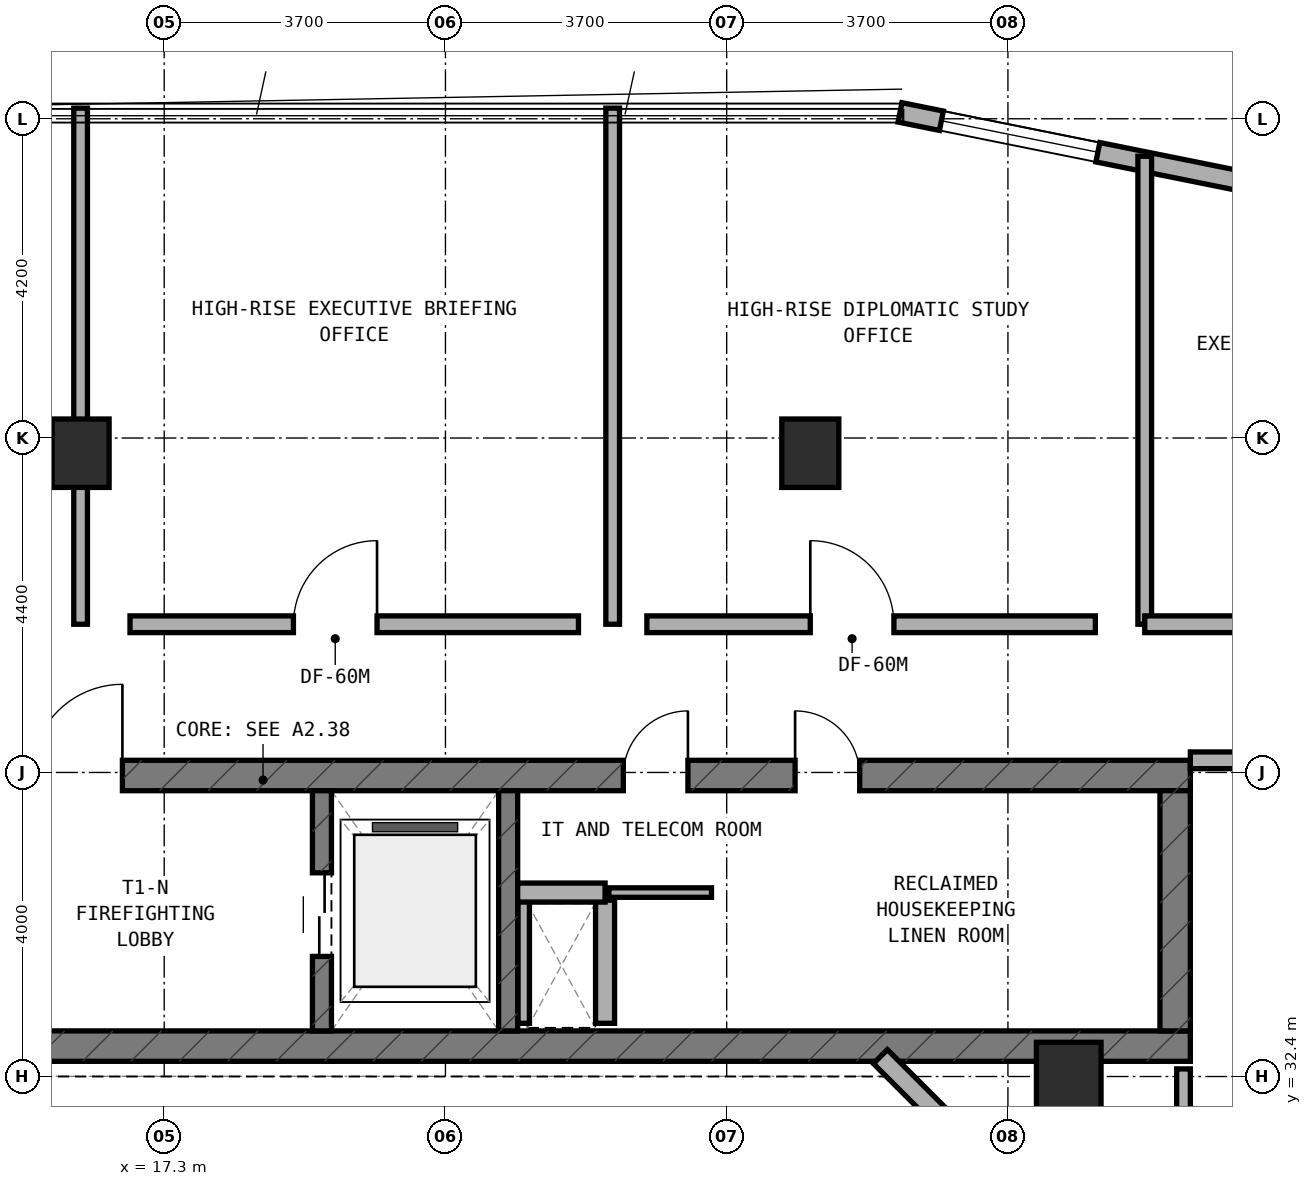
"""IFC4 building model, lengths in metres.
Left out: names, types, materials, properties, quantities, classifications, styles, units other than length and angle.
Written with IfcOpenShell. Run it as: python <this file> out.ifc"""

import sys

from ifc_helpers import new_model, si_unit, direction, frame, frame_2d, origin, origin_2d, place, context, subcontext, project, spatial, rectangle, extrude, element, fill, save


model = new_model("IFC4")
c1 = context("Model", 3, precision=1e-05, world=origin(), true_north=direction((0.0, 1.0)))
c2 = subcontext(c1, "Body", "Model", "MODEL_VIEW")
j1 = project(units=[si_unit("LENGTHUNIT", "METRE"), si_unit("PLANEANGLEUNIT", "RADIAN")], contexts=[c1])
p1 = place(None, origin())
s1 = spatial("IfcSite", under=j1, at=p1, CompositionType="ELEMENT")
p2 = place(p1, origin())
s2 = spatial("IfcBuilding", under=s1, at=p2, CompositionType="ELEMENT")
p3 = place(p2, frame((0.0, 0.0, 169.5)))
s3 = spatial("IfcBuildingStorey", under=s2, at=p3, CompositionType="ELEMENT", Elevation=169.5)
p4 = place(p3, frame((6.4, 32.8, 0.0), z_axis=(0.0, 0.0, 1.0), x_axis=(1.0, 0.0, 0.0)))
e1 = element("IfcWall", 1, at=p4, inside=s3, PredefinedType="SHEAR", context=c2, shape_type="SweptSolid", body=[
    extrude(rectangle(XDim=24.4, YDim=0.4, at=frame_2d((12.2, 0.0))), origin(), (0.0, 0.0, 1.0), 3.5),
])
p5 = place(p4, frame((6.05, 0.0, 0.0)))
e2 = element("IfcOpeningElement", 2, at=p5, cuts=e1, PredefinedType="OPENING", context=c2, shape_type="SweptSolid", body=[
    extrude(rectangle(XDim=1.1, YDim=2.15, at=frame_2d((0.55, 1.075))), frame((0.0, 0.21, 0.0), z_axis=(0.0, -1.0, 0.0), x_axis=(1.0, 0.0, 0.0)), (0.0, 0.0, 1.0), 0.42),
])
p6 = place(p3, frame((6.4, 36.36, 0.0), z_axis=(0.0, 0.0, 1.0), x_axis=(1.0, 0.0, 0.0)))
e3 = element("IfcWall", 3, at=p6, inside=s3, PredefinedType="SHEAR", context=c2, shape_type="SweptSolid", body=[
    extrude(rectangle(XDim=24.4, YDim=0.4, at=frame_2d((12.2, 0.0))), origin(), (0.0, 0.0, 1.0), 3.5),
])
p7 = place(p6, frame((9.15, 0.0, 0.0)))
e4 = element("IfcOpeningElement", 4, at=p7, cuts=e3, PredefinedType="OPENING", context=c2, shape_type="SweptSolid", body=[
    extrude(rectangle(XDim=1.2, YDim=2.15, at=frame_2d((0.6, 1.075))), frame((0.0, 0.21, 0.0), z_axis=(0.0, -1.0, 0.0), x_axis=(1.0, 0.0, 0.0)), (0.0, 0.0, 1.0), 0.42),
])
p8 = place(p6, frame((19.2, 0.0, 0.0)))
e5 = element("IfcOpeningElement", 5, at=p8, cuts=e3, PredefinedType="OPENING", context=c2, shape_type="SweptSolid", body=[
    extrude(rectangle(XDim=0.85, YDim=2.1, at=frame_2d((0.425, 1.05))), frame((0.0, 0.21, 0.0), z_axis=(0.0, -1.0, 0.0), x_axis=(1.0, 0.0, 0.0)), (0.0, 0.0, 1.0), 0.42),
])
p9 = place(p6, frame((16.94, 0.0, 0.0)))
e6 = element("IfcOpeningElement", 6, at=p9, cuts=e3, PredefinedType="OPENING", context=c2, shape_type="SweptSolid", body=[
    extrude(rectangle(XDim=0.85, YDim=2.1, at=frame_2d((0.425, 1.05))), frame((0.0, 0.21, 0.0), z_axis=(0.0, -1.0, 0.0), x_axis=(1.0, 0.0, 0.0)), (0.0, 0.0, 1.0), 0.42),
])
p10 = place(p3, frame((30.6, 33.0, 0.0), z_axis=(0.0, 0.0, 1.0), x_axis=(0.0, 1.0, 0.0)))
e7 = element("IfcWall", 7, at=p10, inside=s3, PredefinedType="SHEAR", context=c2, shape_type="SweptSolid", body=[
    extrude(rectangle(XDim=3.16, YDim=0.4, at=frame_2d((1.58, 0.0))), origin(), (0.0, 0.0, 1.0), 3.5),
])
p11 = place(p3, frame((19.375, 33.0, 0.0), z_axis=(0.0, 0.0, 1.0), x_axis=(0.0, 1.0, 0.0)))
e8 = element("IfcWall", 8, at=p11, inside=s3, PredefinedType="STANDARD", context=c2, shape_type="SweptSolid", body=[
    extrude(rectangle(XDim=3.16, YDim=0.25, at=frame_2d((1.58, 0.0))), origin(), (0.0, 0.0, 1.0), 3.18),
])
p12 = place(p11, frame((0.98, 0.0, 0.0)))
e9 = element("IfcOpeningElement", 9, at=p12, cuts=e8, PredefinedType="OPENING", context=c2, shape_type="SweptSolid", body=[
    extrude(rectangle(XDim=1.1, YDim=2.15, at=frame_2d((0.55, 1.075))), frame((0.0, 0.135, 0.0), z_axis=(0.0, -1.0, 0.0), x_axis=(1.0, 0.0, 0.0)), (0.0, 0.0, 1.0), 0.27),
])
p13 = place(p3, frame((21.825, 33.0, 0.0), z_axis=(0.0, 0.0, 1.0), x_axis=(0.0, 1.0, 0.0)))
e10 = element("IfcWall", 10, at=p13, inside=s3, PredefinedType="STANDARD", context=c2, shape_type="SweptSolid", body=[
    extrude(rectangle(XDim=3.16, YDim=0.25, at=frame_2d((1.58, 0.0))), origin(), (0.0, 0.0, 1.0), 3.18),
])
for number, where, z_axis, x_axis in (
    (11, (16.2, 40.6, 0.0), (0.0, 0.0, 1.0), (1.0, 0.0, 0.0)),
    (12, (25.8, 40.6, 0.0), (0.0, 0.0, 1.0), (1.0, 0.0, 0.0)),
):
    element("IfcColumn", number, at=place(p3, frame(where, z_axis=z_axis, x_axis=x_axis)), inside=s3, PredefinedType="COLUMN", context=c2, shape_type="SweptSolid", body=[
        extrude(rectangle(XDim=0.75, YDim=0.9, at=origin_2d()), origin(), (0.0, 0.0, 1.0), 3.5),
    ])
p14 = place(p3, frame((29.2, 32.35, 0.0), z_axis=(0.0, 0.0, 1.0), x_axis=(1.0, 0.0, 0.0)))
e13 = element("IfcColumn", 13, at=p14, inside=s3, PredefinedType="COLUMN", context=c2, shape_type="SweptSolid", body=[
    extrude(rectangle(XDim=0.85, YDim=1.0, at=origin_2d()), origin(), (0.0, 0.0, 1.0), 3.5),
])
p15 = place(p3, frame((35.982, 43.271, 0.0), z_axis=(0.0, 0.0, 1.0), x_axis=(-0.980315963543, 0.197435082048, 0.0)))
e14 = element("IfcWall", 14, at=p15, inside=s3, PredefinedType="STANDARD", context=c2, shape_type="SweptSolid", body=[
    extrude(rectangle(XDim=9.183, YDim=0.26, at=frame_2d((4.591, 0.0))), origin(), (0.0, 0.0, 1.0), 3.18),
])
p16 = place(p15, frame((1.837, 0.0, 0.85)))
e15 = element("IfcOpeningElement", 15, at=p16, cuts=e14, PredefinedType="OPENING", context=c2, shape_type="SweptSolid", body=[
    extrude(rectangle(XDim=2.1, YDim=1.5, at=frame_2d((1.05, 0.75))), frame((0.0, 0.14, 0.0), z_axis=(0.0, -1.0, 0.0), x_axis=(1.0, 0.0, 0.0)), (0.0, 0.0, 1.0), 0.28),
])
p17 = place(p15, frame((6.527, 0.0, 0.85)))
e16 = element("IfcOpeningElement", 16, at=p17, cuts=e14, PredefinedType="OPENING", context=c2, shape_type="SweptSolid", body=[
    extrude(rectangle(XDim=2.1, YDim=1.5, at=frame_2d((1.05, 0.75))), frame((0.0, 0.14, 0.0), z_axis=(0.0, -1.0, 0.0), x_axis=(1.0, 0.0, 0.0)), (0.0, 0.0, 1.0), 0.28),
])
p18 = place(p3, frame((28.556, 30.828, 0.0), z_axis=(0.0, 0.0, 1.0), x_axis=(-0.707059717605, 0.707153841636, 0.0)))
e17 = element("IfcWall", 17, at=p18, inside=s3, PredefinedType="STANDARD", context=c2, shape_type="SweptSolid", body=[
    extrude(rectangle(XDim=2.594, YDim=0.26, at=frame_2d((1.297, 0.0))), origin(), (0.0, 0.0, 1.0), 3.18),
])
p19 = place(p3, frame((22.03, 33.1, 0.0), z_axis=(0.0, 0.0, 1.0), x_axis=(0.0, 1.0, 0.0)))
e18 = element("IfcWall", 18, at=p19, inside=s3, PredefinedType="PARTITIONING", context=c2, shape_type="SweptSolid", body=[
    extrude(rectangle(XDim=1.62, YDim=0.15, at=frame_2d((0.81, 0.0))), origin(), (0.0, 0.0, 1.0), 3.18),
])
p20 = place(p3, frame((23.1, 33.1, 0.0), z_axis=(0.0, 0.0, 1.0), x_axis=(0.0, 1.0, 0.0)))
e19 = element("IfcWall", 19, at=p20, inside=s3, PredefinedType="SOLIDWALL", context=c2, shape_type="SweptSolid", body=[
    extrude(rectangle(XDim=1.62, YDim=0.25, at=frame_2d((0.81, 0.0))), origin(), (0.0, 0.0, 1.0), 3.18),
])
p21 = place(p3, frame((21.95, 34.82, 0.0), z_axis=(0.0, 0.0, 1.0), x_axis=(1.0, 0.0, 0.0)))
e20 = element("IfcWall", 20, at=p21, inside=s3, PredefinedType="SOLIDWALL", context=c2, shape_type="SweptSolid", body=[
    extrude(rectangle(XDim=1.15, YDim=0.25, at=frame_2d((0.575, 0.0))), origin(), (0.0, 0.0, 1.0), 3.18),
])
p22 = place(p3, frame((23.15, 34.82, 0.0), z_axis=(0.0, 0.0, 1.0), x_axis=(1.0, 0.0, 0.0)))
e21 = element("IfcWall", 21, at=p22, inside=s3, PredefinedType="PARTITIONING", context=c2, shape_type="SweptSolid", body=[
    extrude(rectangle(XDim=1.35, YDim=0.125, at=frame_2d((0.675, 0.0))), origin(), (0.0, 0.0, 1.0), 3.18),
])
for number, where, z_axis, x_axis in (
    (22, (16.2, 38.35, 0.0), (0.0, 0.0, 1.0), (0.0, 1.0, 0.0)),
    (23, (23.2, 38.35, 0.0), (0.0, 0.0, 1.0), (0.0, 1.0, 0.0)),
):
    element("IfcWall", number, at=place(p3, frame(where, z_axis=z_axis, x_axis=x_axis)), inside=s3, PredefinedType="SOLIDWALL", context=c2, shape_type="SweptSolid", body=[
        extrude(rectangle(XDim=6.79, YDim=0.18, at=frame_2d((3.395, 0.0))), origin(), (0.0, 0.0, 1.0), 2.795),
    ])
p23 = place(p3, frame((16.85, 38.35, 0.0), z_axis=(0.0, 0.0, 1.0), x_axis=(1.0, 0.0, 0.0)))
e24 = element("IfcWall", 24, at=p23, inside=s3, PredefinedType="SOLIDWALL", context=c2, shape_type="SweptSolid", body=[
    extrude(rectangle(XDim=5.9, YDim=0.22, at=frame_2d((2.95, 0.0))), origin(), (0.0, 0.0, 1.0), 3.18),
])
p24 = place(p23, frame((2.15, 0.0, 0.0)))
e25 = element("IfcOpeningElement", 25, at=p24, cuts=e24, PredefinedType="OPENING", context=c2, shape_type="SweptSolid", body=[
    extrude(rectangle(XDim=1.1, YDim=2.1, at=frame_2d((0.55, 1.05))), frame((0.0, 0.12, 0.0), z_axis=(0.0, -1.0, 0.0), x_axis=(1.0, 0.0, 0.0)), (0.0, 0.0, 1.0), 0.24),
])
p25 = place(p3, frame((23.65, 38.35, 0.0), z_axis=(0.0, 0.0, 1.0), x_axis=(1.0, 0.0, 0.0)))
e26 = element("IfcWall", 26, at=p25, inside=s3, PredefinedType="SOLIDWALL", context=c2, shape_type="SweptSolid", body=[
    extrude(rectangle(XDim=5.9, YDim=0.22, at=frame_2d((2.95, 0.0))), origin(), (0.0, 0.0, 1.0), 2.855),
])
p26 = place(p25, frame((2.15, 0.0, 0.0)))
e27 = element("IfcOpeningElement", 27, at=p26, cuts=e26, PredefinedType="OPENING", context=c2, shape_type="SweptSolid", body=[
    extrude(rectangle(XDim=1.1, YDim=2.1, at=frame_2d((0.55, 1.05))), frame((0.0, 0.12, 0.0), z_axis=(0.0, -1.0, 0.0), x_axis=(1.0, 0.0, 0.0)), (0.0, 0.0, 1.0), 0.24),
])
p27 = place(p3, frame((30.2, 38.35, 0.0), z_axis=(0.0, 0.0, 1.0), x_axis=(0.0, 1.0, 0.0)))
e28 = element("IfcWall", 28, at=p27, inside=s3, PredefinedType="SOLIDWALL", context=c2, shape_type="SweptSolid", body=[
    extrude(rectangle(XDim=6.157, YDim=0.18, at=frame_2d((3.079, 0.0))), origin(), (0.0, 0.0, 1.0), 2.795),
])
p28 = place(p3, frame((30.2, 38.35, 0.0), z_axis=(0.0, 0.0, 1.0), x_axis=(1.0, 0.0, 0.0)))
e29 = element("IfcWall", 29, at=p28, inside=s3, PredefinedType="SOLIDWALL", context=c2, shape_type="SweptSolid", body=[
    extrude(rectangle(XDim=6.25, YDim=0.22, at=frame_2d((3.125, 0.0))), origin(), (0.0, 0.0, 1.0), 2.795),
])
p29 = place(p28, frame((2.37, 0.0, 0.0)))
e30 = element("IfcOpeningElement", 30, at=p29, cuts=e29, PredefinedType="OPENING", context=c2, shape_type="SweptSolid", body=[
    extrude(rectangle(XDim=0.95, YDim=2.1, at=frame_2d((0.475, 1.05))), frame((0.0, 0.12, 0.0), z_axis=(0.0, -1.0, 0.0), x_axis=(1.0, 0.0, 0.0)), (0.0, 0.0, 1.0), 0.24),
])
p30 = place(p3, frame((30.71, 17.5, 0.0), z_axis=(0.0, 0.0, 1.0), x_axis=(0.0, 1.0, 0.0)))
e31 = element("IfcWall", 31, at=p30, inside=s3, PredefinedType="SOLIDWALL", context=c2, shape_type="SweptSolid", body=[
    extrude(rectangle(XDim=15.0, YDim=0.18, at=frame_2d((7.5, 0.0))), origin(), (0.0, 0.0, 1.0), 2.855),
])
p31 = place(p3, frame((30.8, 36.56, 0.0), z_axis=(0.0, 0.0, 1.0), x_axis=(1.0, 0.0, 0.0)))
e32 = element("IfcWall", 32, at=p31, inside=s3, PredefinedType="SOLIDWALL", context=c2, shape_type="SweptSolid", body=[
    extrude(rectangle(XDim=5.65, YDim=0.22, at=frame_2d((2.825, 0.0))), origin(), (0.0, 0.0, 1.0), 2.795),
])
p32 = place(p31, frame((2.35, 0.0, 0.0)))
e33 = element("IfcOpeningElement", 33, at=p32, cuts=e32, PredefinedType="OPENING", context=c2, shape_type="SweptSolid", body=[
    extrude(rectangle(XDim=0.95, YDim=2.1, at=frame_2d((0.475, 1.05))), frame((0.0, 0.12, 0.0), z_axis=(0.0, -1.0, 0.0), x_axis=(1.0, 0.0, 0.0)), (0.0, 0.0, 1.0), 0.24),
])
p33 = place(p17, origin())
e34 = element("IfcWindow", 34, at=p33, inside=s3, PartitioningType="SINGLE_PANEL", PredefinedType="WINDOW", context=c2, shape_type="SweptSolid", body=[
    extrude(rectangle(XDim=2.1, YDim=1.5, at=frame_2d((1.05, 0.75))), frame((0.0, 0.03, 0.0), z_axis=(0.0, -1.0, 0.0), x_axis=(1.0, 0.0, 0.0)), (0.0, 0.0, 1.0), 0.06),
])
fill(e16, e34)
p34 = place(p7, origin())
e35 = element("IfcDoor", 35, at=p34, inside=s3, OperationType="SINGLE_SWING_RIGHT", PredefinedType="DOOR", context=c2, shape_type="SweptSolid", body=[
    extrude(rectangle(XDim=1.2, YDim=2.15, at=frame_2d((0.6, 1.075))), frame((0.0, 0.025, 0.0), z_axis=(0.0, -1.0, 0.0), x_axis=(1.0, 0.0, 0.0)), (0.0, 0.0, 1.0), 0.05),
])
fill(e4, e35)
p35 = place(p12, origin())
e36 = element("IfcDoor", 36, at=p35, inside=s3, OperationType="DOUBLE_DOOR_SLIDING", PredefinedType="DOOR", context=c2, shape_type="SweptSolid", body=[
    extrude(rectangle(XDim=1.1, YDim=2.15, at=frame_2d((0.55, 1.075))), frame((0.0, 0.025, 0.0), z_axis=(0.0, -1.0, 0.0), x_axis=(1.0, 0.0, 0.0)), (0.0, 0.0, 1.0), 0.05),
])
fill(e9, e36)
p36 = place(p8, origin())
e37 = element("IfcDoor", 37, at=p36, inside=s3, OperationType="SINGLE_SWING_LEFT", PredefinedType="DOOR", context=c2, shape_type="SweptSolid", body=[
    extrude(rectangle(XDim=0.85, YDim=2.1, at=frame_2d((0.425, 1.05))), frame((0.0, 0.025, 0.0), z_axis=(0.0, -1.0, 0.0), x_axis=(1.0, 0.0, 0.0)), (0.0, 0.0, 1.0), 0.05),
])
fill(e5, e37)
p37 = place(p9, origin())
e38 = element("IfcDoor", 38, at=p37, inside=s3, OperationType="SINGLE_SWING_RIGHT", PredefinedType="DOOR", context=c2, shape_type="SweptSolid", body=[
    extrude(rectangle(XDim=0.85, YDim=2.1, at=frame_2d((0.425, 1.05))), frame((0.0, 0.025, 0.0), z_axis=(0.0, -1.0, 0.0), x_axis=(1.0, 0.0, 0.0)), (0.0, 0.0, 1.0), 0.05),
])
fill(e6, e38)
p38 = place(p24, origin())
e39 = element("IfcDoor", 39, at=p38, inside=s3, OperationType="SINGLE_SWING_RIGHT", PredefinedType="DOOR", context=c2, shape_type="SweptSolid", body=[
    extrude(rectangle(XDim=1.1, YDim=2.1, at=frame_2d((0.55, 1.05))), frame((0.0, 0.025, 0.0), z_axis=(0.0, -1.0, 0.0), x_axis=(1.0, 0.0, 0.0)), (0.0, 0.0, 1.0), 0.05),
])
fill(e25, e39)
p39 = place(p26, origin())
e40 = element("IfcDoor", 40, at=p39, inside=s3, OperationType="SINGLE_SWING_LEFT", PredefinedType="DOOR", context=c2, shape_type="SweptSolid", body=[
    extrude(rectangle(XDim=1.1, YDim=2.1, at=frame_2d((0.55, 1.05))), frame((0.0, 0.025, 0.0), z_axis=(0.0, -1.0, 0.0), x_axis=(1.0, 0.0, 0.0)), (0.0, 0.0, 1.0), 0.05),
])
fill(e27, e40)
save(model, sys.argv[1])
